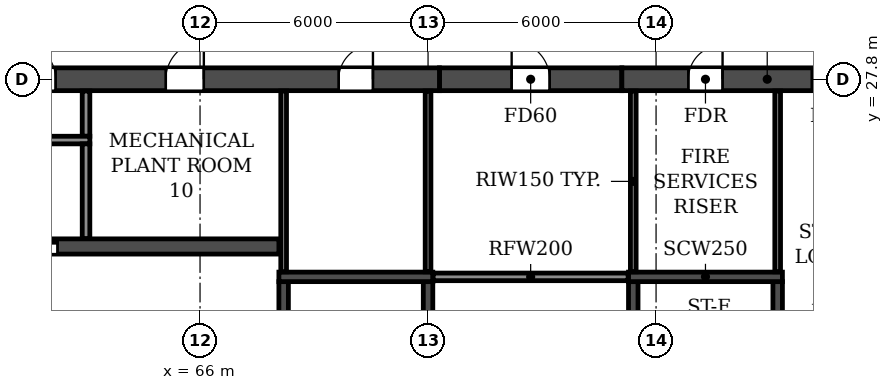
"""IFC4 building model, lengths in metres.
Left out: names, types, materials, properties, quantities, classifications, styles, units other than length and angle.
Written with IfcOpenShell. Run it as: python <this file> out.ifc"""

import sys

from ifc_helpers import new_model, si_unit, direction, frame, frame_2d, origin, place, context, subcontext, project, spatial, rectangle, extrude, element, fill, save


model = new_model("IFC4")
c1 = context("Model", 3, precision=1e-05, world=origin(), true_north=direction((0.0, 1.0)))
c2 = subcontext(c1, "Body", "Model", "MODEL_VIEW")
j1 = project(units=[si_unit("LENGTHUNIT", "METRE"), si_unit("PLANEANGLEUNIT", "RADIAN")], contexts=[c1])
p1 = place(None, origin())
s1 = spatial("IfcSite", under=j1, at=p1, CompositionType="ELEMENT")
p2 = place(p1, origin())
s2 = spatial("IfcBuilding", under=s1, at=p2, CompositionType="ELEMENT")
p3 = place(p2, frame((0.0, 0.0, 214.8)))
s3 = spatial("IfcBuildingStorey", under=s2, at=p3, CompositionType="ELEMENT", Elevation=214.8)
p4 = place(p3, frame((72.3, 27.8, 0.0), z_axis=(0.0, 0.0, 1.0), x_axis=(1.0, 0.0, 0.0)))
e1 = element("IfcWall", 1, at=p4, inside=s3, PredefinedType="SHEAR", context=c2, shape_type="SweptSolid", body=[
    extrude(rectangle(XDim=4.8, YDim=0.6, at=frame_2d((2.4, 0.0))), origin(), (0.0, 0.0, 1.0), 6.38),
])
p5 = place(p4, frame((1.9, 0.0, 0.0)))
e2 = element("IfcOpeningElement", 2, at=p5, cuts=e1, PredefinedType="OPENING", context=c2, shape_type="SweptSolid", body=[
    extrude(rectangle(XDim=1.0, YDim=2.1, at=frame_2d((0.5, 1.05))), frame((0.0, 0.31, 0.0), z_axis=(0.0, -1.0, 0.0), x_axis=(1.0, 0.0, 0.0)), (0.0, 0.0, 1.0), 0.62),
])
p6 = place(p3, frame((29.7, 27.8, 0.0), z_axis=(0.0, 0.0, 1.0), x_axis=(1.0, 0.0, 0.0)))
e3 = element("IfcWall", 3, at=p6, inside=s3, PredefinedType="SOLIDWALL", context=c2, shape_type="SweptSolid", body=[
    extrude(rectangle(XDim=42.6, YDim=0.6, at=frame_2d((21.3, 0.0))), origin(), (0.0, 0.0, 1.0), 6.38),
])
p7 = place(p6, frame((1.75, 0.0, 0.0)))
e4 = element("IfcOpeningElement", 4, at=p7, cuts=e3, PredefinedType="OPENING", context=c2, shape_type="SweptSolid", body=[
    extrude(rectangle(XDim=0.9, YDim=2.1, at=frame_2d((0.45, 1.05))), frame((0.0, 0.31, 0.0), z_axis=(0.0, -1.0, 0.0), x_axis=(1.0, 0.0, 0.0)), (0.0, 0.0, 1.0), 0.62),
])
p8 = place(p6, frame((7.5, 0.0, 0.0)))
e5 = element("IfcOpeningElement", 5, at=p8, cuts=e3, PredefinedType="OPENING", context=c2, shape_type="SweptSolid", body=[
    extrude(rectangle(XDim=1.0, YDim=2.1, at=frame_2d((0.5, 1.05))), frame((0.0, 0.31, 0.0), z_axis=(0.0, -1.0, 0.0), x_axis=(1.0, 0.0, 0.0)), (0.0, 0.0, 1.0), 0.62),
])
p9 = place(p6, frame((12.7, 0.0, 0.0)))
e6 = element("IfcOpeningElement", 6, at=p9, cuts=e3, PredefinedType="OPENING", context=c2, shape_type="SweptSolid", body=[
    extrude(rectangle(XDim=1.0, YDim=2.1, at=frame_2d((0.5, 1.05))), frame((0.0, 0.31, 0.0), z_axis=(0.0, -1.0, 0.0), x_axis=(1.0, 0.0, 0.0)), (0.0, 0.0, 1.0), 0.62),
])
p10 = place(p6, frame((17.9, 0.0, 0.0)))
e7 = element("IfcOpeningElement", 7, at=p10, cuts=e3, PredefinedType="OPENING", context=c2, shape_type="SweptSolid", body=[
    extrude(rectangle(XDim=1.0, YDim=2.1, at=frame_2d((0.5, 1.05))), frame((0.0, 0.31, 0.0), z_axis=(0.0, -1.0, 0.0), x_axis=(1.0, 0.0, 0.0)), (0.0, 0.0, 1.0), 0.62),
])
p11 = place(p6, frame((20.8, 0.0, 0.0)))
e8 = element("IfcOpeningElement", 8, at=p11, cuts=e3, PredefinedType="OPENING", context=c2, shape_type="SweptSolid", body=[
    extrude(rectangle(XDim=1.0, YDim=2.1, at=frame_2d((0.5, 1.05))), frame((0.0, 0.31, 0.0), z_axis=(0.0, -1.0, 0.0), x_axis=(1.0, 0.0, 0.0)), (0.0, 0.0, 1.0), 0.62),
])
p12 = place(p6, frame((23.7, 0.0, 0.0)))
e9 = element("IfcOpeningElement", 9, at=p12, cuts=e3, PredefinedType="OPENING", context=c2, shape_type="SweptSolid", body=[
    extrude(rectangle(XDim=1.0, YDim=2.1, at=frame_2d((0.5, 1.05))), frame((0.0, 0.31, 0.0), z_axis=(0.0, -1.0, 0.0), x_axis=(1.0, 0.0, 0.0)), (0.0, 0.0, 1.0), 0.62),
])
p13 = place(p6, frame((26.3, 0.0, 0.0)))
e10 = element("IfcOpeningElement", 10, at=p13, cuts=e3, PredefinedType="OPENING", context=c2, shape_type="SweptSolid", body=[
    extrude(rectangle(XDim=1.0, YDim=2.1, at=frame_2d((0.5, 1.05))), frame((0.0, 0.31, 0.0), z_axis=(0.0, -1.0, 0.0), x_axis=(1.0, 0.0, 0.0)), (0.0, 0.0, 1.0), 0.62),
])
p14 = place(p6, frame((28.9, 0.0, 0.0)))
e11 = element("IfcOpeningElement", 11, at=p14, cuts=e3, PredefinedType="OPENING", context=c2, shape_type="SweptSolid", body=[
    extrude(rectangle(XDim=1.0, YDim=2.1, at=frame_2d((0.5, 1.05))), frame((0.0, 0.31, 0.0), z_axis=(0.0, -1.0, 0.0), x_axis=(1.0, 0.0, 0.0)), (0.0, 0.0, 1.0), 0.62),
])
p15 = place(p6, frame((31.5, 0.0, 0.0)))
e12 = element("IfcOpeningElement", 12, at=p15, cuts=e3, PredefinedType="OPENING", context=c2, shape_type="SweptSolid", body=[
    extrude(rectangle(XDim=1.0, YDim=2.1, at=frame_2d((0.5, 1.05))), frame((0.0, 0.31, 0.0), z_axis=(0.0, -1.0, 0.0), x_axis=(1.0, 0.0, 0.0)), (0.0, 0.0, 1.0), 0.62),
])
p16 = place(p6, frame((35.4, 0.0, 0.0)))
e13 = element("IfcOpeningElement", 13, at=p16, cuts=e3, PredefinedType="OPENING", context=c2, shape_type="SweptSolid", body=[
    extrude(rectangle(XDim=1.0, YDim=2.1, at=frame_2d((0.5, 1.05))), frame((0.0, 0.31, 0.0), z_axis=(0.0, -1.0, 0.0), x_axis=(1.0, 0.0, 0.0)), (0.0, 0.0, 1.0), 0.62),
])
p17 = place(p6, frame((39.95, 0.0, 0.0)))
e14 = element("IfcOpeningElement", 14, at=p17, cuts=e3, PredefinedType="OPENING", context=c2, shape_type="SweptSolid", body=[
    extrude(rectangle(XDim=0.9, YDim=2.1, at=frame_2d((0.45, 1.05))), frame((0.0, 0.31, 0.0), z_axis=(0.0, -1.0, 0.0), x_axis=(1.0, 0.0, 0.0)), (0.0, 0.0, 1.0), 0.62),
])
p18 = place(p3, frame((77.1, 27.8, 0.0), z_axis=(0.0, 0.0, 1.0), x_axis=(1.0, 0.0, 0.0)))
e15 = element("IfcWall", 15, at=p18, inside=s3, PredefinedType="SOLIDWALL", context=c2, shape_type="SweptSolid", body=[
    extrude(rectangle(XDim=6.7, YDim=0.6, at=frame_2d((3.35, 0.0))), origin(), (0.0, 0.0, 1.0), 6.38),
])
p19 = place(p18, frame((1.75, 0.0, 0.0)))
e16 = element("IfcOpeningElement", 16, at=p19, cuts=e15, PredefinedType="OPENING", context=c2, shape_type="SweptSolid", body=[
    extrude(rectangle(XDim=0.9, YDim=2.1, at=frame_2d((0.45, 1.05))), frame((0.0, 0.31, 0.0), z_axis=(0.0, -1.0, 0.0), x_axis=(1.0, 0.0, 0.0)), (0.0, 0.0, 1.0), 0.62),
])
p20 = place(p18, frame((5.0, 0.0, 0.0)))
e17 = element("IfcOpeningElement", 17, at=p20, cuts=e15, PredefinedType="OPENING", context=c2, shape_type="SweptSolid", body=[
    extrude(rectangle(XDim=1.0, YDim=2.1, at=frame_2d((0.5, 1.05))), frame((0.0, 0.31, 0.0), z_axis=(0.0, -1.0, 0.0), x_axis=(1.0, 0.0, 0.0)), (0.0, 0.0, 1.0), 0.62),
])
p21 = place(p3, frame((33.925, 23.4, 0.0), z_axis=(0.0, 0.0, 1.0), x_axis=(1.0, 0.0, 0.0)))
e18 = element("IfcWall", 18, at=p21, inside=s3, PredefinedType="SOLIDWALL", context=c2, shape_type="SweptSolid", body=[
    extrude(rectangle(XDim=34.15, YDim=0.4, at=frame_2d((17.075, 0.0))), origin(), (0.0, 0.0, 1.0), 6.38),
])
p22 = place(p21, frame((16.175, 0.0, 0.0)))
e19 = element("IfcOpeningElement", 19, at=p22, cuts=e18, PredefinedType="OPENING", context=c2, shape_type="SweptSolid", body=[
    extrude(rectangle(XDim=1.8, YDim=2.1, at=frame_2d((0.9, 1.05))), frame((0.0, 0.21, 0.0), z_axis=(0.0, -1.0, 0.0), x_axis=(1.0, 0.0, 0.0)), (0.0, 0.0, 1.0), 0.42),
])
p23 = place(p21, frame((0.625, 0.0, 0.0)))
e20 = element("IfcOpeningElement", 20, at=p23, cuts=e18, PredefinedType="OPENING", context=c2, shape_type="SweptSolid", body=[
    extrude(rectangle(XDim=1.1, YDim=2.1, at=frame_2d((0.55, 1.05))), frame((0.0, 0.21, 0.0), z_axis=(0.0, -1.0, 0.0), x_axis=(1.0, 0.0, 0.0)), (0.0, 0.0, 1.0), 0.42),
])
p24 = place(p21, frame((3.225, 0.0, 0.0)))
e21 = element("IfcOpeningElement", 21, at=p24, cuts=e18, PredefinedType="OPENING", context=c2, shape_type="SweptSolid", body=[
    extrude(rectangle(XDim=1.1, YDim=2.1, at=frame_2d((0.55, 1.05))), frame((0.0, 0.21, 0.0), z_axis=(0.0, -1.0, 0.0), x_axis=(1.0, 0.0, 0.0)), (0.0, 0.0, 1.0), 0.42),
])
p25 = place(p21, frame((5.825, 0.0, 0.0)))
e22 = element("IfcOpeningElement", 22, at=p25, cuts=e18, PredefinedType="OPENING", context=c2, shape_type="SweptSolid", body=[
    extrude(rectangle(XDim=1.1, YDim=2.1, at=frame_2d((0.55, 1.05))), frame((0.0, 0.21, 0.0), z_axis=(0.0, -1.0, 0.0), x_axis=(1.0, 0.0, 0.0)), (0.0, 0.0, 1.0), 0.42),
])
p26 = place(p21, frame((8.425, 0.0, 0.0)))
e23 = element("IfcOpeningElement", 23, at=p26, cuts=e18, PredefinedType="OPENING", context=c2, shape_type="SweptSolid", body=[
    extrude(rectangle(XDim=1.1, YDim=2.1, at=frame_2d((0.55, 1.05))), frame((0.0, 0.21, 0.0), z_axis=(0.0, -1.0, 0.0), x_axis=(1.0, 0.0, 0.0)), (0.0, 0.0, 1.0), 0.42),
])
p27 = place(p21, frame((11.025, 0.0, 0.0)))
e24 = element("IfcOpeningElement", 24, at=p27, cuts=e18, PredefinedType="OPENING", context=c2, shape_type="SweptSolid", body=[
    extrude(rectangle(XDim=1.1, YDim=2.1, at=frame_2d((0.55, 1.05))), frame((0.0, 0.21, 0.0), z_axis=(0.0, -1.0, 0.0), x_axis=(1.0, 0.0, 0.0)), (0.0, 0.0, 1.0), 0.42),
])
p28 = place(p21, frame((13.625, 0.0, 0.0)))
e25 = element("IfcOpeningElement", 25, at=p28, cuts=e18, PredefinedType="OPENING", context=c2, shape_type="SweptSolid", body=[
    extrude(rectangle(XDim=1.1, YDim=2.1, at=frame_2d((0.55, 1.05))), frame((0.0, 0.21, 0.0), z_axis=(0.0, -1.0, 0.0), x_axis=(1.0, 0.0, 0.0)), (0.0, 0.0, 1.0), 0.42),
])
p29 = place(p21, frame((27.225, 0.0, 0.0)))
e26 = element("IfcOpeningElement", 26, at=p29, cuts=e18, PredefinedType="OPENING", context=c2, shape_type="SweptSolid", body=[
    extrude(rectangle(XDim=1.1, YDim=2.1, at=frame_2d((0.55, 1.05))), frame((0.0, 0.21, 0.0), z_axis=(0.0, -1.0, 0.0), x_axis=(1.0, 0.0, 0.0)), (0.0, 0.0, 1.0), 0.42),
])
p30 = place(p3, frame((68.2, 14.8, 0.0), z_axis=(0.0, 0.0, 1.0), x_axis=(0.0, 1.0, 0.0)))
e27 = element("IfcWall", 27, at=p30, inside=s3, PredefinedType="SOLIDWALL", context=c2, shape_type="SweptSolid", body=[
    extrude(rectangle(XDim=7.675, YDim=0.25, at=frame_2d((3.837, 0.0))), origin(), (0.0, 0.0, 1.0), 6.38),
])
p31 = place(p30, frame((0.5, 0.0, 0.0)))
e28 = element("IfcOpeningElement", 28, at=p31, cuts=e27, PredefinedType="OPENING", context=c2, shape_type="SweptSolid", body=[
    extrude(rectangle(XDim=1.0, YDim=2.1, at=frame_2d((0.5, 1.05))), frame((0.0, 0.135, 0.0), z_axis=(0.0, -1.0, 0.0), x_axis=(1.0, 0.0, 0.0)), (0.0, 0.0, 1.0), 0.27),
])
p32 = place(p3, frame((72.0, 14.8, 0.0), z_axis=(0.0, 0.0, 1.0), x_axis=(0.0, 1.0, 0.0)))
e29 = element("IfcWall", 29, at=p32, inside=s3, PredefinedType="SOLIDWALL", context=c2, shape_type="SweptSolid", body=[
    extrude(rectangle(XDim=7.675, YDim=0.25, at=frame_2d((3.837, 0.0))), origin(), (0.0, 0.0, 1.0), 6.38),
])
p33 = place(p3, frame((68.075, 22.6, 0.0), z_axis=(0.0, 0.0, 1.0), x_axis=(1.0, 0.0, 0.0)))
e30 = element("IfcWall", 30, at=p33, inside=s3, PredefinedType="SOLIDWALL", context=c2, shape_type="SweptSolid", body=[
    extrude(rectangle(XDim=4.05, YDim=0.25, at=frame_2d((2.025, 0.0))), origin(), (0.0, 0.0, 1.0), 6.38),
])
p34 = place(p3, frame((77.4, 14.8, 0.0), z_axis=(0.0, 0.0, 1.0), x_axis=(0.0, 1.0, 0.0)))
e31 = element("IfcWall", 31, at=p34, inside=s3, PredefinedType="SOLIDWALL", context=c2, shape_type="SweptSolid", body=[
    extrude(rectangle(XDim=7.675, YDim=0.25, at=frame_2d((3.837, 0.0))), origin(), (0.0, 0.0, 1.0), 6.38),
])
p35 = place(p34, frame((0.5, 0.0, 0.0)))
e32 = element("IfcOpeningElement", 32, at=p35, cuts=e31, PredefinedType="OPENING", context=c2, shape_type="SweptSolid", body=[
    extrude(rectangle(XDim=1.0, YDim=2.1, at=frame_2d((0.5, 1.05))), frame((0.0, 0.135, 0.0), z_axis=(0.0, -1.0, 0.0), x_axis=(1.0, 0.0, 0.0)), (0.0, 0.0, 1.0), 0.27),
])
p36 = place(p3, frame((81.2, 14.8, 0.0), z_axis=(0.0, 0.0, 1.0), x_axis=(0.0, 1.0, 0.0)))
e33 = element("IfcWall", 33, at=p36, inside=s3, PredefinedType="SOLIDWALL", context=c2, shape_type="SweptSolid", body=[
    extrude(rectangle(XDim=7.675, YDim=0.25, at=frame_2d((3.837, 0.0))), origin(), (0.0, 0.0, 1.0), 6.38),
])
p37 = place(p36, frame((0.5, 0.0, 0.0)))
e34 = element("IfcOpeningElement", 34, at=p37, cuts=e33, PredefinedType="OPENING", context=c2, shape_type="SweptSolid", body=[
    extrude(rectangle(XDim=1.0, YDim=2.1, at=frame_2d((0.5, 1.05))), frame((0.0, 0.135, 0.0), z_axis=(0.0, -1.0, 0.0), x_axis=(1.0, 0.0, 0.0)), (0.0, 0.0, 1.0), 0.27),
])
p38 = place(p3, frame((77.275, 22.6, 0.0), z_axis=(0.0, 0.0, 1.0), x_axis=(1.0, 0.0, 0.0)))
e35 = element("IfcWall", 35, at=p38, inside=s3, PredefinedType="SOLIDWALL", context=c2, shape_type="SweptSolid", body=[
    extrude(rectangle(XDim=4.05, YDim=0.25, at=frame_2d((2.025, 0.0))), origin(), (0.0, 0.0, 1.0), 6.38),
])
p39 = place(p3, frame((63.0, 26.3, 0.0), z_axis=(0.0, 0.0, 1.0), x_axis=(0.0, 1.0, 0.0)))
e36 = element("IfcWall", 36, at=p39, inside=s3, PredefinedType="PARTITIONING", context=c2, shape_type="SweptSolid", body=[
    extrude(rectangle(XDim=1.19, YDim=0.2, at=frame_2d((0.595, 0.0))), origin(), (0.0, 0.0, 1.0), 6.38),
])
p40 = place(p3, frame((72.135, 22.6, 0.0), z_axis=(0.0, 0.0, 1.0), x_axis=(1.0, 0.0, 0.0)))
e37 = element("IfcWall", 37, at=p40, inside=s3, PredefinedType="PARTITIONING", context=c2, shape_type="SweptSolid", body=[
    extrude(rectangle(XDim=5.13, YDim=0.2, at=frame_2d((2.565, 0.0))), origin(), (0.0, 0.0, 1.0), 6.38),
])
for number, where, z_axis, x_axis in (
    (38, (68.2, 22.735, 0.0), (0.0, 0.0, 1.0), (0.0, 1.0, 0.0)),
    (39, (72.0, 22.735, 0.0), (0.0, 0.0, 1.0), (0.0, 1.0, 0.0)),
    (40, (77.4, 22.735, 0.0), (0.0, 0.0, 1.0), (0.0, 1.0, 0.0)),
    (41, (81.2, 22.735, 0.0), (0.0, 0.0, 1.0), (0.0, 1.0, 0.0)),
):
    element("IfcWall", number, at=place(p3, frame(where, z_axis=z_axis, x_axis=x_axis)), inside=s3, PredefinedType="PARTITIONING", context=c2, shape_type="SweptSolid", body=[
        extrude(rectangle(XDim=4.755, YDim=0.15, at=frame_2d((2.377, 0.0))), origin(), (0.0, 0.0, 1.0), 6.38),
    ])
p41 = place(p3, frame((57.7, 26.2, 0.0), z_axis=(0.0, 0.0, 1.0), x_axis=(1.0, 0.0, 0.0)))
e42 = element("IfcWall", 42, at=p41, inside=s3, PredefinedType="PARTITIONING", context=c2, shape_type="SweptSolid", body=[
    extrude(rectangle(XDim=5.4, YDim=0.2, at=frame_2d((2.7, 0.0))), origin(), (0.0, 0.0, 1.0), 6.38),
])
p42 = place(p3, frame((63.0, 23.61, 0.0), z_axis=(0.0, 0.0, 1.0), x_axis=(0.0, 1.0, 0.0)))
e43 = element("IfcWall", 43, at=p42, inside=s3, PredefinedType="PARTITIONING", context=c2, shape_type="SweptSolid", body=[
    extrude(rectangle(XDim=2.49, YDim=0.2, at=frame_2d((1.245, 0.0))), origin(), (0.0, 0.0, 1.0), 6.38),
])
p43 = place(p15, origin())
e44 = element("IfcDoor", 44, at=p43, inside=s3, OperationType="SINGLE_SWING_LEFT", PredefinedType="DOOR", context=c2, shape_type="SweptSolid", body=[
    extrude(rectangle(XDim=1.0, YDim=2.1, at=frame_2d((0.5, 1.05))), frame((0.0, 0.025, 0.0), z_axis=(0.0, -1.0, 0.0), x_axis=(1.0, 0.0, 0.0)), (0.0, 0.0, 1.0), 0.05),
])
fill(e12, e44)
p44 = place(p16, origin())
e45 = element("IfcDoor", 45, at=p44, inside=s3, OperationType="SINGLE_SWING_RIGHT", PredefinedType="DOOR", context=c2, shape_type="SweptSolid", body=[
    extrude(rectangle(XDim=1.0, YDim=2.1, at=frame_2d((0.5, 1.05))), frame((0.0, 0.025, 0.0), z_axis=(0.0, -1.0, 0.0), x_axis=(1.0, 0.0, 0.0)), (0.0, 0.0, 1.0), 0.05),
])
fill(e13, e45)
p45 = place(p17, origin())
e46 = element("IfcDoor", 46, at=p45, inside=s3, OperationType="SINGLE_SWING_RIGHT", PredefinedType="DOOR", context=c2, shape_type="SweptSolid", body=[
    extrude(rectangle(XDim=0.9, YDim=2.1, at=frame_2d((0.45, 1.05))), frame((0.0, 0.025, 0.0), z_axis=(0.0, -1.0, 0.0), x_axis=(1.0, 0.0, 0.0)), (0.0, 0.0, 1.0), 0.05),
])
fill(e14, e46)
p46 = place(p5, origin())
e47 = element("IfcDoor", 47, at=p46, inside=s3, OperationType="SINGLE_SWING_LEFT", PredefinedType="DOOR", context=c2, shape_type="SweptSolid", body=[
    extrude(rectangle(XDim=1.0, YDim=2.1, at=frame_2d((0.5, 1.05))), frame((0.0, 0.025, 0.0), z_axis=(0.0, -1.0, 0.0), x_axis=(1.0, 0.0, 0.0)), (0.0, 0.0, 1.0), 0.05),
])
fill(e2, e47)
p47 = place(p19, origin())
e48 = element("IfcDoor", 48, at=p47, inside=s3, OperationType="SINGLE_SWING_RIGHT", PredefinedType="DOOR", context=c2, shape_type="SweptSolid", body=[
    extrude(rectangle(XDim=0.9, YDim=2.1, at=frame_2d((0.45, 1.05))), frame((0.0, 0.025, 0.0), z_axis=(0.0, -1.0, 0.0), x_axis=(1.0, 0.0, 0.0)), (0.0, 0.0, 1.0), 0.05),
])
fill(e16, e48)
p48 = place(p20, origin())
e49 = element("IfcDoor", 49, at=p48, inside=s3, OperationType="SINGLE_SWING_RIGHT", PredefinedType="DOOR", context=c2, shape_type="SweptSolid", body=[
    extrude(rectangle(XDim=1.0, YDim=2.1, at=frame_2d((0.5, 1.05))), frame((0.0, 0.025, 0.0), z_axis=(0.0, -1.0, 0.0), x_axis=(1.0, 0.0, 0.0)), (0.0, 0.0, 1.0), 0.05),
])
fill(e17, e49)
p49 = place(p29, origin())
e50 = element("IfcDoor", 50, at=p49, inside=s3, OperationType="DOUBLE_DOOR_SLIDING", PredefinedType="DOOR", context=c2, shape_type="SweptSolid", body=[
    extrude(rectangle(XDim=1.1, YDim=2.1, at=frame_2d((0.55, 1.05))), frame((0.0, 0.025, 0.0), z_axis=(0.0, -1.0, 0.0), x_axis=(1.0, 0.0, 0.0)), (0.0, 0.0, 1.0), 0.05),
])
fill(e26, e50)
save(model, sys.argv[1])
